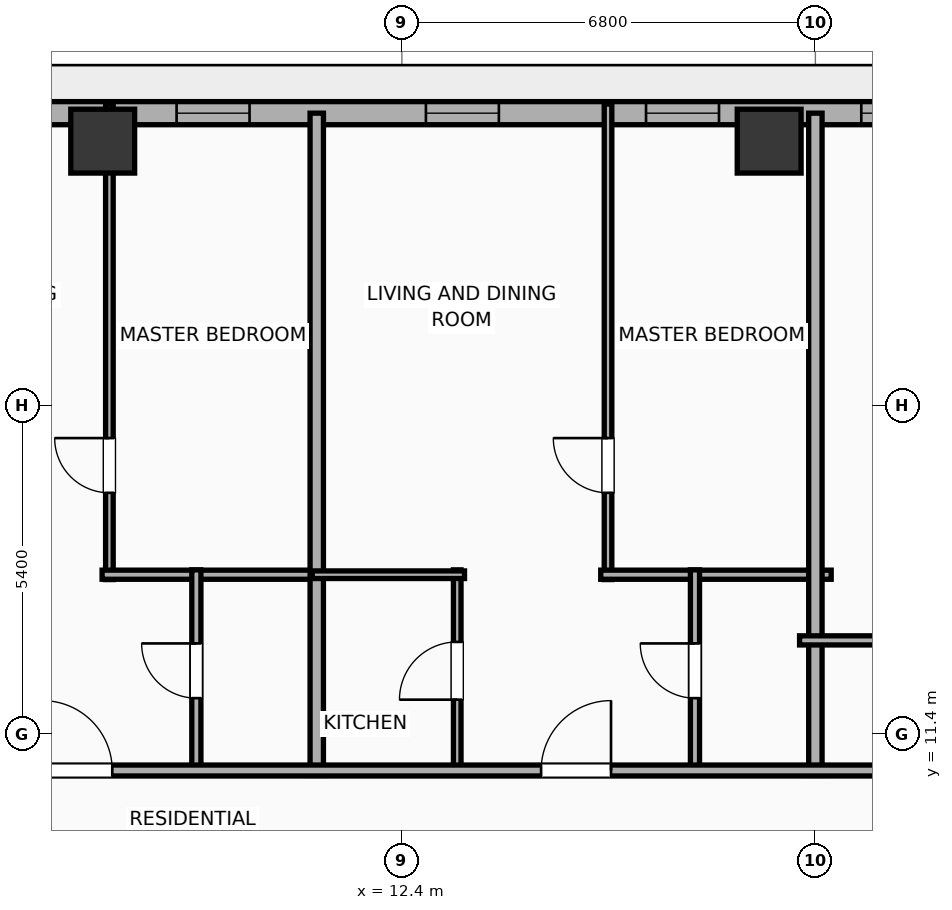
"""IFC4 building model, lengths in metres.
Left out: names, types, materials, properties, quantities, classifications, styles, units other than length and angle.
Written with IfcOpenShell. Run it as: python <this file> out.ifc"""

import sys

from ifc_helpers import new_model, si_unit, direction, frame, frame_2d, origin, origin_2d, place, context, subcontext, project, spatial, rectangle, hollow_rectangle, extrude, element, fill, save


model = new_model("IFC4")
c1 = context("Model", 3, precision=1e-05, world=origin(), true_north=direction((0.0, 1.0)))
c2 = subcontext(c1, "Body", "Model", "MODEL_VIEW")
j1 = project(units=[si_unit("LENGTHUNIT", "METRE"), si_unit("PLANEANGLEUNIT", "RADIAN")], contexts=[c1])
p1 = place(None, origin())
s1 = spatial("IfcSite", under=j1, at=p1, CompositionType="ELEMENT")
p2 = place(p1, origin())
s2 = spatial("IfcBuilding", under=s1, at=p2, CompositionType="ELEMENT")
p3 = place(p2, frame((0.0, 0.0, 85.8)))
s3 = spatial("IfcBuildingStorey", under=s2, at=p3, CompositionType="ELEMENT", Elevation=85.8)
for number, where, z_axis, x_axis in (
    (1, (18.44, 21.15, -0.4), (0.0, 0.0, 1.0), (1.0, 0.0, 0.0)),
    (2, (7.48, 21.15, -0.4), (0.0, 0.0, 1.0), (1.0, 0.0, 0.0)),
):
    element("IfcColumn", number, at=place(p3, frame(where, z_axis=z_axis, x_axis=x_axis)), inside=s3, PredefinedType="COLUMN", context=c2, shape_type="SweptSolid", body=[
        extrude(hollow_rectangle(XDim=1.05, YDim=1.05, WallThickness=0.036, at=origin_2d()), origin(), (0.0, 0.0, 1.0), 4.3),
    ])
p4 = place(p3, frame((-25.381, 21.61, 0.0), z_axis=(0.0, 0.0, 1.0), x_axis=(1.0, 0.0, 0.0)))
e3 = element("IfcWall", 3, at=p4, inside=s3, PredefinedType="ELEMENTEDWALL", context=c2, shape_type="SweptSolid", body=[
    extrude(rectangle(XDim=54.763, YDim=0.38, at=frame_2d((27.381, 0.0))), origin(), (0.0, 0.0, 1.0), 2.54),
])
p5 = place(p4, frame((5.645, 0.0, 0.75)))
e4 = element("IfcOpeningElement", 4, at=p5, cuts=e3, PredefinedType="OPENING", context=c2, shape_type="SweptSolid", body=[
    extrude(rectangle(XDim=2.4, YDim=1.45, at=frame_2d((1.2, 0.725))), frame((0.0, 0.2, 0.0), z_axis=(0.0, -1.0, 0.0), x_axis=(1.0, 0.0, 0.0)), (0.0, 0.0, 1.0), 0.4),
])
p6 = place(p4, frame((47.567, 0.0, 0.75)))
e5 = element("IfcOpeningElement", 5, at=p6, cuts=e3, PredefinedType="OPENING", context=c2, shape_type="SweptSolid", body=[
    extrude(rectangle(XDim=2.4, YDim=1.45, at=frame_2d((1.2, 0.725))), frame((0.0, 0.2, 0.0), z_axis=(0.0, -1.0, 0.0), x_axis=(1.0, 0.0, 0.0)), (0.0, 0.0, 1.0), 0.4),
])
p7 = place(p4, frame((1.635, 0.0, 0.55)))
e6 = element("IfcOpeningElement", 6, at=p7, cuts=e3, PredefinedType="OPENING", context=c2, shape_type="SweptSolid", body=[
    extrude(rectangle(XDim=1.2, YDim=1.15, at=frame_2d((0.6, 0.575))), frame((0.0, 0.2, 0.0), z_axis=(0.0, -1.0, 0.0), x_axis=(1.0, 0.0, 0.0)), (0.0, 0.0, 1.0), 0.4),
])
p8 = place(p4, frame((8.996, 0.0, 0.55)))
e7 = element("IfcOpeningElement", 7, at=p8, cuts=e3, PredefinedType="OPENING", context=c2, shape_type="SweptSolid", body=[
    extrude(rectangle(XDim=1.2, YDim=1.15, at=frame_2d((0.6, 0.575))), frame((0.0, 0.2, 0.0), z_axis=(0.0, -1.0, 0.0), x_axis=(1.0, 0.0, 0.0)), (0.0, 0.0, 1.0), 0.4),
])
p9 = place(p4, frame((13.576, 0.0, 0.55)))
e8 = element("IfcOpeningElement", 8, at=p9, cuts=e3, PredefinedType="OPENING", context=c2, shape_type="SweptSolid", body=[
    extrude(rectangle(XDim=1.2, YDim=1.15, at=frame_2d((0.6, 0.575))), frame((0.0, 0.2, 0.0), z_axis=(0.0, -1.0, 0.0), x_axis=(1.0, 0.0, 0.0)), (0.0, 0.0, 1.0), 0.4),
])
p10 = place(p4, frame((17.676, 0.0, 0.55)))
e9 = element("IfcOpeningElement", 9, at=p10, cuts=e3, PredefinedType="OPENING", context=c2, shape_type="SweptSolid", body=[
    extrude(rectangle(XDim=1.2, YDim=1.15, at=frame_2d((0.6, 0.575))), frame((0.0, 0.2, 0.0), z_axis=(0.0, -1.0, 0.0), x_axis=(1.0, 0.0, 0.0)), (0.0, 0.0, 1.0), 0.4),
])
p11 = place(p4, frame((20.319, 0.0, 0.55)))
e10 = element("IfcOpeningElement", 10, at=p11, cuts=e3, PredefinedType="OPENING", context=c2, shape_type="SweptSolid", body=[
    extrude(rectangle(XDim=0.85, YDim=1.15, at=frame_2d((0.425, 0.575))), frame((0.0, 0.2, 0.0), z_axis=(0.0, -1.0, 0.0), x_axis=(1.0, 0.0, 0.0)), (0.0, 0.0, 1.0), 0.4),
])
p12 = place(p4, frame((24.844, 0.0, 0.55)))
e11 = element("IfcOpeningElement", 11, at=p12, cuts=e3, PredefinedType="OPENING", context=c2, shape_type="SweptSolid", body=[
    extrude(rectangle(XDim=1.2, YDim=1.15, at=frame_2d((0.6, 0.575))), frame((0.0, 0.2, 0.0), z_axis=(0.0, -1.0, 0.0), x_axis=(1.0, 0.0, 0.0)), (0.0, 0.0, 1.0), 0.4),
])
p13 = place(p4, frame((29.976, 0.0, 0.55)))
e12 = element("IfcOpeningElement", 12, at=p13, cuts=e3, PredefinedType="OPENING", context=c2, shape_type="SweptSolid", body=[
    extrude(rectangle(XDim=1.2, YDim=1.15, at=frame_2d((0.6, 0.575))), frame((0.0, 0.2, 0.0), z_axis=(0.0, -1.0, 0.0), x_axis=(1.0, 0.0, 0.0)), (0.0, 0.0, 1.0), 0.4),
])
p14 = place(p4, frame((34.076, 0.0, 0.55)))
e13 = element("IfcOpeningElement", 13, at=p14, cuts=e3, PredefinedType="OPENING", context=c2, shape_type="SweptSolid", body=[
    extrude(rectangle(XDim=1.2, YDim=1.15, at=frame_2d((0.6, 0.575))), frame((0.0, 0.2, 0.0), z_axis=(0.0, -1.0, 0.0), x_axis=(1.0, 0.0, 0.0)), (0.0, 0.0, 1.0), 0.4),
])
p15 = place(p4, frame((38.176, 0.0, 0.55)))
e14 = element("IfcOpeningElement", 14, at=p15, cuts=e3, PredefinedType="OPENING", context=c2, shape_type="SweptSolid", body=[
    extrude(rectangle(XDim=1.2, YDim=1.15, at=frame_2d((0.6, 0.575))), frame((0.0, 0.2, 0.0), z_axis=(0.0, -1.0, 0.0), x_axis=(1.0, 0.0, 0.0)), (0.0, 0.0, 1.0), 0.4),
])
p16 = place(p4, frame((41.796, 0.0, 0.55)))
e15 = element("IfcOpeningElement", 15, at=p16, cuts=e3, PredefinedType="OPENING", context=c2, shape_type="SweptSolid", body=[
    extrude(rectangle(XDim=1.2, YDim=1.15, at=frame_2d((0.6, 0.575))), frame((0.0, 0.2, 0.0), z_axis=(0.0, -1.0, 0.0), x_axis=(1.0, 0.0, 0.0)), (0.0, 0.0, 1.0), 0.4),
])
p17 = place(p4, frame((45.336, 0.0, 0.55)))
e16 = element("IfcOpeningElement", 16, at=p17, cuts=e3, PredefinedType="OPENING", context=c2, shape_type="SweptSolid", body=[
    extrude(rectangle(XDim=1.2, YDim=1.15, at=frame_2d((0.6, 0.575))), frame((0.0, 0.2, 0.0), z_axis=(0.0, -1.0, 0.0), x_axis=(1.0, 0.0, 0.0)), (0.0, 0.0, 1.0), 0.4),
])
p18 = place(p4, frame((53.022, 0.0, 0.55)))
e17 = element("IfcOpeningElement", 17, at=p18, cuts=e3, PredefinedType="OPENING", context=c2, shape_type="SweptSolid", body=[
    extrude(rectangle(XDim=0.85, YDim=1.15, at=frame_2d((0.425, 0.575))), frame((0.0, 0.2, 0.0), z_axis=(0.0, -1.0, 0.0), x_axis=(1.0, 0.0, 0.0)), (0.0, 0.0, 1.0), 0.4),
])
p19 = place(p3, frame((7.59, 13.94, 0.0), z_axis=(0.0, 0.0, 1.0), x_axis=(0.0, 1.0, 0.0)))
e18 = element("IfcWall", 18, at=p19, inside=s3, PredefinedType="PARTITIONING", context=c2, shape_type="SweptSolid", body=[
    extrude(rectangle(XDim=7.82, YDim=0.125, at=frame_2d((3.91, 0.0))), origin(), (0.0, 0.0, 1.0), 2.54),
])
p20 = place(p19, frame((1.427, 0.0, 0.0)))
e19 = element("IfcOpeningElement", 19, at=p20, cuts=e18, PredefinedType="OPENING", context=c2, shape_type="SweptSolid", body=[
    extrude(rectangle(XDim=0.9, YDim=2.05, at=frame_2d((0.45, 1.025))), frame((0.0, 0.073, 0.0), z_axis=(0.0, -1.0, 0.0), x_axis=(1.0, 0.0, 0.0)), (0.0, 0.0, 1.0), 0.145),
])
p21 = place(p3, frame((7.47, 14.02, 0.0), z_axis=(0.0, 0.0, 1.0), x_axis=(1.0, 0.0, 0.0)))
e20 = element("IfcWall", 20, at=p21, inside=s3, PredefinedType="PLUMBINGWALL", context=c2, shape_type="SweptSolid", body=[
    extrude(rectangle(XDim=3.605, YDim=0.15, at=frame_2d((1.802, 0.0))), origin(), (0.0, 0.0, 1.0), 3.65),
])
p22 = place(p3, frame((9.02, 10.78, 0.0), z_axis=(0.0, 0.0, 1.0), x_axis=(0.0, 1.0, 0.0)))
e21 = element("IfcWall", 21, at=p22, inside=s3, PredefinedType="PLUMBINGWALL", context=c2, shape_type="SweptSolid", body=[
    extrude(rectangle(XDim=3.32, YDim=0.15, at=frame_2d((1.66, 0.0))), origin(), (0.0, 0.0, 1.0), 3.65),
])
p23 = place(p22, frame((1.21, 0.0, 0.0)))
e22 = element("IfcOpeningElement", 22, at=p23, cuts=e21, PredefinedType="OPENING", context=c2, shape_type="SweptSolid", body=[
    extrude(rectangle(XDim=0.9, YDim=2.05, at=frame_2d((0.45, 1.025))), frame((0.0, 0.085, 0.0), z_axis=(0.0, -1.0, 0.0), x_axis=(1.0, 0.0, 0.0)), (0.0, 0.0, 1.0), 0.17),
])
p24 = place(p3, frame((11.0, 10.72, 0.0), z_axis=(0.0, 0.0, 1.0), x_axis=(0.0, 1.0, 0.0)))
e23 = element("IfcWall", 23, at=p24, inside=s3, PredefinedType="PARTITIONING", context=c2, shape_type="SweptSolid", body=[
    extrude(rectangle(XDim=10.89, YDim=0.22, at=frame_2d((5.445, 0.0))), origin(), (0.0, 0.0, 1.0), 3.65),
])
p25 = place(p3, frame((15.79, 13.94, 0.0), z_axis=(0.0, 0.0, 1.0), x_axis=(0.0, 1.0, 0.0)))
e24 = element("IfcWall", 24, at=p25, inside=s3, PredefinedType="PARTITIONING", context=c2, shape_type="SweptSolid", body=[
    extrude(rectangle(XDim=7.82, YDim=0.125, at=frame_2d((3.91, 0.0))), origin(), (0.0, 0.0, 1.0), 3.65),
])
p26 = place(p25, frame((1.427, 0.0, 0.0)))
e25 = element("IfcOpeningElement", 25, at=p26, cuts=e24, PredefinedType="OPENING", context=c2, shape_type="SweptSolid", body=[
    extrude(rectangle(XDim=0.9, YDim=2.05, at=frame_2d((0.45, 1.025))), frame((0.0, 0.073, 0.0), z_axis=(0.0, -1.0, 0.0), x_axis=(1.0, 0.0, 0.0)), (0.0, 0.0, 1.0), 0.145),
])
p27 = place(p3, frame((15.67, 14.02, 0.0), z_axis=(0.0, 0.0, 1.0), x_axis=(1.0, 0.0, 0.0)))
e26 = element("IfcWall", 26, at=p27, inside=s3, PredefinedType="PLUMBINGWALL", context=c2, shape_type="SweptSolid", body=[
    extrude(rectangle(XDim=3.79, YDim=0.15, at=frame_2d((1.895, 0.0))), origin(), (0.0, 0.0, 1.0), 3.65),
])
p28 = place(p3, frame((13.31, 10.78, 0.0), z_axis=(0.0, 0.0, 1.0), x_axis=(0.0, 1.0, 0.0)))
e27 = element("IfcWall", 27, at=p28, inside=s3, PredefinedType="PARTITIONING", context=c2, shape_type="SweptSolid", body=[
    extrude(rectangle(XDim=3.32, YDim=0.125, at=frame_2d((1.66, 0.0))), origin(), (0.0, 0.0, 1.0), 3.65),
])
p29 = place(p28, frame((1.185, 0.0, 0.0)))
e28 = element("IfcOpeningElement", 28, at=p29, cuts=e27, PredefinedType="OPENING", context=c2, shape_type="SweptSolid", body=[
    extrude(rectangle(XDim=0.95, YDim=2.05, at=frame_2d((0.475, 1.025))), frame((0.0, 0.073, 0.0), z_axis=(0.0, -1.0, 0.0), x_axis=(1.0, 0.0, 0.0)), (0.0, 0.0, 1.0), 0.145),
])
p30 = place(p3, frame((10.925, 14.02, 0.0), z_axis=(0.0, 0.0, 1.0), x_axis=(1.0, 0.0, 0.0)))
e29 = element("IfcWall", 29, at=p30, inside=s3, PredefinedType="PARTITIONING", context=c2, shape_type="SweptSolid", body=[
    extrude(rectangle(XDim=2.505, YDim=0.125, at=frame_2d((1.252, 0.0))), origin(), (0.0, 0.0, 1.0), 3.65),
])
p31 = place(p3, frame((17.22, 10.78, 0.0), z_axis=(0.0, 0.0, 1.0), x_axis=(0.0, 1.0, 0.0)))
e30 = element("IfcWall", 30, at=p31, inside=s3, PredefinedType="PLUMBINGWALL", context=c2, shape_type="SweptSolid", body=[
    extrude(rectangle(XDim=3.32, YDim=0.15, at=frame_2d((1.66, 0.0))), origin(), (0.0, 0.0, 1.0), 3.65),
])
p32 = place(p31, frame((1.21, 0.0, 0.0)))
e31 = element("IfcOpeningElement", 31, at=p32, cuts=e30, PredefinedType="OPENING", context=c2, shape_type="SweptSolid", body=[
    extrude(rectangle(XDim=0.9, YDim=2.05, at=frame_2d((0.45, 1.025))), frame((0.0, 0.085, 0.0), z_axis=(0.0, -1.0, 0.0), x_axis=(1.0, 0.0, 0.0)), (0.0, 0.0, 1.0), 0.17),
])
p33 = place(p3, frame((19.2, 10.72, 0.0), z_axis=(0.0, 0.0, 1.0), x_axis=(0.0, 1.0, 0.0)))
e32 = element("IfcWall", 32, at=p33, inside=s3, PredefinedType="PARTITIONING", context=c2, shape_type="SweptSolid", body=[
    extrude(rectangle(XDim=10.89, YDim=0.22, at=frame_2d((5.445, 0.0))), origin(), (0.0, 0.0, 1.0), 2.54),
])
p34 = place(p3, frame((18.94, 12.94, 0.0), z_axis=(0.0, 0.0, 1.0), x_axis=(1.0, 0.0, 0.0)))
e33 = element("IfcWall", 33, at=p34, inside=s3, PredefinedType="PLUMBINGWALL", context=c2, shape_type="SweptSolid", body=[
    extrude(rectangle(XDim=3.05, YDim=0.15, at=frame_2d((1.525, 0.0))), origin(), (0.0, 0.0, 1.0), 3.65),
])
p35 = place(p3, frame((-29.21, 10.8, 0.0), z_axis=(0.0, 0.0, 1.0), x_axis=(1.0, 0.0, 0.0)))
e34 = element("IfcWall", 34, at=p35, inside=s3, PredefinedType="PARTITIONING", context=c2, shape_type="SweptSolid", body=[
    extrude(rectangle(XDim=62.42, YDim=0.18, at=frame_2d((31.21, 0.0))), origin(), (0.0, 0.0, 1.0), 3.65),
])
p36 = place(p35, frame((3.264, 0.0, 0.0)))
e35 = element("IfcOpeningElement", 35, at=p36, cuts=e34, PredefinedType="OPENING", context=c2, shape_type="SweptSolid", body=[
    extrude(rectangle(XDim=1.15, YDim=2.05, at=frame_2d((0.575, 1.025))), frame((0.0, 0.1, 0.0), z_axis=(0.0, -1.0, 0.0), x_axis=(1.0, 0.0, 0.0)), (0.0, 0.0, 1.0), 0.2),
])
p37 = place(p35, frame((11.116, 0.0, 0.0)))
e36 = element("IfcOpeningElement", 36, at=p37, cuts=e34, PredefinedType="OPENING", context=c2, shape_type="SweptSolid", body=[
    extrude(rectangle(XDim=1.15, YDim=2.05, at=frame_2d((0.575, 1.025))), frame((0.0, 0.1, 0.0), z_axis=(0.0, -1.0, 0.0), x_axis=(1.0, 0.0, 0.0)), (0.0, 0.0, 1.0), 0.2),
])
p38 = place(p35, frame((19.3, 0.0, 0.0)))
e37 = element("IfcOpeningElement", 37, at=p38, cuts=e34, PredefinedType="OPENING", context=c2, shape_type="SweptSolid", body=[
    extrude(rectangle(XDim=1.15, YDim=2.05, at=frame_2d((0.575, 1.025))), frame((0.0, 0.1, 0.0), z_axis=(0.0, -1.0, 0.0), x_axis=(1.0, 0.0, 0.0)), (0.0, 0.0, 1.0), 0.2),
])
p39 = place(p35, frame((27.452, 0.0, 0.0)))
e38 = element("IfcOpeningElement", 38, at=p39, cuts=e34, PredefinedType="OPENING", context=c2, shape_type="SweptSolid", body=[
    extrude(rectangle(XDim=1.15, YDim=2.05, at=frame_2d((0.575, 1.025))), frame((0.0, 0.1, 0.0), z_axis=(0.0, -1.0, 0.0), x_axis=(1.0, 0.0, 0.0)), (0.0, 0.0, 1.0), 0.2),
])
p40 = place(p35, frame((35.697, 0.0, 0.0)))
e39 = element("IfcOpeningElement", 39, at=p40, cuts=e34, PredefinedType="OPENING", context=c2, shape_type="SweptSolid", body=[
    extrude(rectangle(XDim=1.15, YDim=2.05, at=frame_2d((0.575, 1.025))), frame((0.0, 0.1, 0.0), z_axis=(0.0, -1.0, 0.0), x_axis=(1.0, 0.0, 0.0)), (0.0, 0.0, 1.0), 0.2),
])
p41 = place(p35, frame((43.899, 0.0, 0.0)))
e40 = element("IfcOpeningElement", 40, at=p41, cuts=e34, PredefinedType="OPENING", context=c2, shape_type="SweptSolid", body=[
    extrude(rectangle(XDim=1.15, YDim=2.05, at=frame_2d((0.575, 1.025))), frame((0.0, 0.1, 0.0), z_axis=(0.0, -1.0, 0.0), x_axis=(1.0, 0.0, 0.0)), (0.0, 0.0, 1.0), 0.2),
])
p42 = place(p35, frame((51.599, 0.0, 0.0)))
e41 = element("IfcOpeningElement", 41, at=p42, cuts=e34, PredefinedType="OPENING", context=c2, shape_type="SweptSolid", body=[
    extrude(rectangle(XDim=1.15, YDim=2.05, at=frame_2d((0.575, 1.025))), frame((0.0, 0.1, 0.0), z_axis=(0.0, -1.0, 0.0), x_axis=(1.0, 0.0, 0.0)), (0.0, 0.0, 1.0), 0.2),
])
p43 = place(p35, frame((59.242, 0.0, 0.0)))
e42 = element("IfcOpeningElement", 42, at=p43, cuts=e34, PredefinedType="OPENING", context=c2, shape_type="SweptSolid", body=[
    extrude(rectangle(XDim=0.9, YDim=2.05, at=frame_2d((0.45, 1.025))), frame((0.0, 0.1, 0.0), z_axis=(0.0, -1.0, 0.0), x_axis=(1.0, 0.0, 0.0)), (0.0, 0.0, 1.0), 0.2),
])
p44 = place(p14, origin())
e43 = element("IfcWindow", 43, at=p44, inside=s3, PartitioningType="SINGLE_PANEL", PredefinedType="WINDOW", context=c2, shape_type="SweptSolid", body=[
    extrude(rectangle(XDim=1.2, YDim=1.15, at=frame_2d((0.6, 0.575))), frame((0.0, 0.03, 0.0), z_axis=(0.0, -1.0, 0.0), x_axis=(1.0, 0.0, 0.0)), (0.0, 0.0, 1.0), 0.06),
])
fill(e13, e43)
p45 = place(p15, origin())
e44 = element("IfcWindow", 44, at=p45, inside=s3, PartitioningType="SINGLE_PANEL", PredefinedType="WINDOW", context=c2, shape_type="SweptSolid", body=[
    extrude(rectangle(XDim=1.2, YDim=1.15, at=frame_2d((0.6, 0.575))), frame((0.0, 0.03, 0.0), z_axis=(0.0, -1.0, 0.0), x_axis=(1.0, 0.0, 0.0)), (0.0, 0.0, 1.0), 0.06),
])
fill(e14, e44)
p46 = place(p16, origin())
e45 = element("IfcWindow", 45, at=p46, inside=s3, PartitioningType="SINGLE_PANEL", PredefinedType="WINDOW", context=c2, shape_type="SweptSolid", body=[
    extrude(rectangle(XDim=1.2, YDim=1.15, at=frame_2d((0.6, 0.575))), frame((0.0, 0.03, 0.0), z_axis=(0.0, -1.0, 0.0), x_axis=(1.0, 0.0, 0.0)), (0.0, 0.0, 1.0), 0.06),
])
fill(e15, e45)
p47 = place(p17, origin())
e46 = element("IfcWindow", 46, at=p47, inside=s3, PartitioningType="SINGLE_PANEL", PredefinedType="WINDOW", context=c2, shape_type="SweptSolid", body=[
    extrude(rectangle(XDim=1.2, YDim=1.15, at=frame_2d((0.6, 0.575))), frame((0.0, 0.03, 0.0), z_axis=(0.0, -1.0, 0.0), x_axis=(1.0, 0.0, 0.0)), (0.0, 0.0, 1.0), 0.06),
])
fill(e16, e46)
p48 = place(p20, origin())
e47 = element("IfcDoor", 47, at=p48, inside=s3, OperationType="SINGLE_SWING_RIGHT", PredefinedType="DOOR", context=c2, shape_type="SweptSolid", body=[
    extrude(rectangle(XDim=0.9, YDim=2.05, at=frame_2d((0.45, 1.025))), frame((0.0, 0.025, 0.0), z_axis=(0.0, -1.0, 0.0), x_axis=(1.0, 0.0, 0.0)), (0.0, 0.0, 1.0), 0.05),
])
fill(e19, e47)
p49 = place(p23, origin())
e48 = element("IfcDoor", 48, at=p49, inside=s3, OperationType="SINGLE_SWING_RIGHT", PredefinedType="DOOR", context=c2, shape_type="SweptSolid", body=[
    extrude(rectangle(XDim=0.9, YDim=2.05, at=frame_2d((0.45, 1.025))), frame((0.0, 0.025, 0.0), z_axis=(0.0, -1.0, 0.0), x_axis=(1.0, 0.0, 0.0)), (0.0, 0.0, 1.0), 0.05),
])
fill(e22, e48)
p50 = place(p26, origin())
e49 = element("IfcDoor", 49, at=p50, inside=s3, OperationType="SINGLE_SWING_RIGHT", PredefinedType="DOOR", context=c2, shape_type="SweptSolid", body=[
    extrude(rectangle(XDim=0.9, YDim=2.05, at=frame_2d((0.45, 1.025))), frame((0.0, 0.025, 0.0), z_axis=(0.0, -1.0, 0.0), x_axis=(1.0, 0.0, 0.0)), (0.0, 0.0, 1.0), 0.05),
])
fill(e25, e49)
p51 = place(p29, origin())
e50 = element("IfcDoor", 50, at=p51, inside=s3, OperationType="SINGLE_SWING_LEFT", PredefinedType="DOOR", context=c2, shape_type="SweptSolid", body=[
    extrude(rectangle(XDim=0.95, YDim=2.05, at=frame_2d((0.475, 1.025))), frame((0.0, 0.025, 0.0), z_axis=(0.0, -1.0, 0.0), x_axis=(1.0, 0.0, 0.0)), (0.0, 0.0, 1.0), 0.05),
])
fill(e28, e50)
p52 = place(p32, origin())
e51 = element("IfcDoor", 51, at=p52, inside=s3, OperationType="SINGLE_SWING_RIGHT", PredefinedType="DOOR", context=c2, shape_type="SweptSolid", body=[
    extrude(rectangle(XDim=0.9, YDim=2.05, at=frame_2d((0.45, 1.025))), frame((0.0, 0.025, 0.0), z_axis=(0.0, -1.0, 0.0), x_axis=(1.0, 0.0, 0.0)), (0.0, 0.0, 1.0), 0.05),
])
fill(e31, e51)
p53 = place(p40, origin())
e52 = element("IfcDoor", 52, at=p53, inside=s3, OperationType="SINGLE_SWING_LEFT", PredefinedType="DOOR", context=c2, shape_type="SweptSolid", body=[
    extrude(rectangle(XDim=1.15, YDim=2.05, at=frame_2d((0.575, 1.025))), frame((0.0, 0.025, 0.0), z_axis=(0.0, -1.0, 0.0), x_axis=(1.0, 0.0, 0.0)), (0.0, 0.0, 1.0), 0.05),
])
fill(e39, e52)
p54 = place(p41, origin())
e53 = element("IfcDoor", 53, at=p54, inside=s3, OperationType="SINGLE_SWING_RIGHT", PredefinedType="DOOR", context=c2, shape_type="SweptSolid", body=[
    extrude(rectangle(XDim=1.15, YDim=2.05, at=frame_2d((0.575, 1.025))), frame((0.0, 0.025, 0.0), z_axis=(0.0, -1.0, 0.0), x_axis=(1.0, 0.0, 0.0)), (0.0, 0.0, 1.0), 0.05),
])
fill(e40, e53)
save(model, sys.argv[1])
